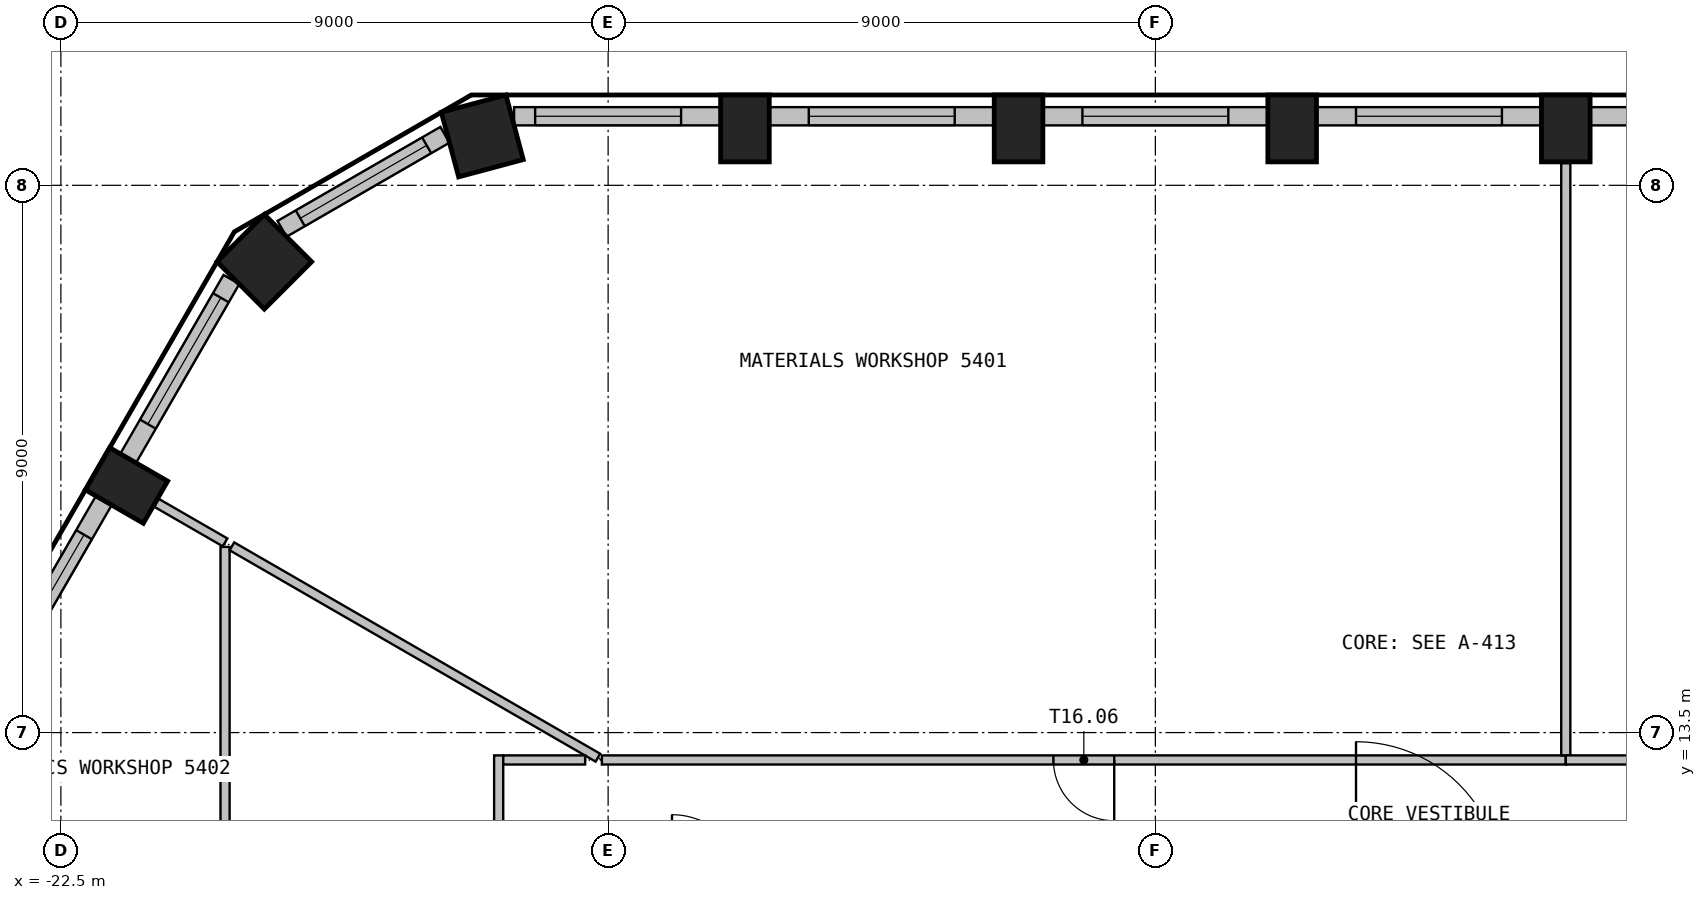
"""IFC4 building model, lengths in metres.
Left out: names, types, materials, properties, quantities, classifications, styles, units other than length and angle.
Written with IfcOpenShell. Run it as: python <this file> out.ifc"""

import sys

from ifc_helpers import new_model, si_unit, direction, frame, frame_2d, origin, origin_2d, place, context, subcontext, project, spatial, rectangle, extrude, element, fill, save


model = new_model("IFC4")
c1 = context("Model", 3, precision=1e-05, world=origin(), true_north=direction((0.0, 1.0)))
c2 = subcontext(c1, "Body", "Model", "MODEL_VIEW")
j1 = project(units=[si_unit("LENGTHUNIT", "METRE"), si_unit("PLANEANGLEUNIT", "RADIAN")], contexts=[c1])
p1 = place(None, origin())
s1 = spatial("IfcSite", under=j1, at=p1, CompositionType="ELEMENT")
p2 = place(p1, origin())
s2 = spatial("IfcBuilding", under=s1, at=p2, CompositionType="ELEMENT")
p3 = place(p2, frame((0.0, 0.0, 219.0)))
s3 = spatial("IfcBuildingStorey", under=s2, at=p3, CompositionType="ELEMENT", Elevation=219.0)
for number, where, z_axis, x_axis in (
    (1, (2.25, 23.436, 0.0), (0.0, 0.0, 1.0), (-1.0, 0.0, 0.0)),
    (2, (-2.25, 23.436, 0.0), (0.0, 0.0, 1.0), (-1.0, 0.0, 0.0)),
    (3, (-6.75, 23.436, 0.0), (0.0, 0.0, 1.0), (-1.0, 0.0, 0.0)),
    (4, (-11.25, 23.436, 0.0), (0.0, 0.0, 1.0), (-1.0, 0.0, 0.0)),
):
    element("IfcColumn", number, at=place(p3, frame(where, z_axis=z_axis, x_axis=x_axis)), inside=s3, PredefinedType="COLUMN", context=c2, shape_type="SweptSolid", body=[
        extrude(rectangle(XDim=0.8, YDim=1.1, at=origin_2d()), origin(), (0.0, 0.0, 1.0), 3.55),
    ])
for number, where, z_axis, x_axis in (
    (5, (-15.57, 23.312, 0.0), (0.0, 0.0, 1.0), (-0.966, -0.259, 0.0)),
    (6, (-19.154, 21.242, 0.0), (0.0, 0.0, 1.0), (-0.707, -0.707, 0.0)),
):
    element("IfcColumn", number, at=place(p3, frame(where, z_axis=z_axis, x_axis=x_axis)), inside=s3, PredefinedType="COLUMN", context=c2, shape_type="SweptSolid", body=[
        extrude(rectangle(XDim=1.1, YDim=1.1, at=origin_2d()), origin(), (0.0, 0.0, 1.0), 3.55),
    ])
p4 = place(p3, frame((-21.421, 17.563, 0.0), z_axis=(0.0, 0.0, 1.0), x_axis=(-0.5, -0.866025403784, 0.0)))
e7 = element("IfcColumn", 7, at=p4, inside=s3, PredefinedType="COLUMN", context=c2, shape_type="SweptSolid", body=[
    extrude(rectangle(XDim=0.8, YDim=1.1, at=origin_2d()), origin(), (0.0, 0.0, 1.0), 3.55),
])
p5 = place(p3, frame((6.35, 23.635, 0.0), z_axis=(0.0, 0.0, 1.0), x_axis=(-1.0, 0.0, 0.0)))
e8 = element("IfcWall", 8, at=p5, inside=s3, PredefinedType="SOLIDWALL", context=c2, shape_type="SweptSolid", body=[
    extrude(rectangle(XDim=3.699, YDim=0.3, at=frame_2d((1.85, 0.0))), origin(), (0.0, 0.0, 1.0), 3.55),
])
p6 = place(p5, frame((0.649, 0.0, 0.9)))
e9 = element("IfcOpeningElement", 9, at=p6, cuts=e8, PredefinedType="OPENING", context=c2, shape_type="SweptSolid", body=[
    extrude(rectangle(XDim=2.4, YDim=2.1, at=frame_2d((1.2, 1.05))), frame((0.0, 0.16, 0.0), z_axis=(0.0, -1.0, 0.0), x_axis=(1.0, 0.0, 0.0)), (0.0, 0.0, 1.0), 0.32),
])
p7 = place(p3, frame((1.85, 23.635, 0.0), z_axis=(0.0, 0.0, 1.0), x_axis=(-1.0, 0.0, 0.0)))
e10 = element("IfcWall", 10, at=p7, inside=s3, PredefinedType="SOLIDWALL", context=c2, shape_type="SweptSolid", body=[
    extrude(rectangle(XDim=3.699, YDim=0.3, at=frame_2d((1.85, 0.0))), origin(), (0.0, 0.0, 1.0), 3.55),
])
p8 = place(p7, frame((0.649, 0.0, 0.9)))
e11 = element("IfcOpeningElement", 11, at=p8, cuts=e10, PredefinedType="OPENING", context=c2, shape_type="SweptSolid", body=[
    extrude(rectangle(XDim=2.4, YDim=2.1, at=frame_2d((1.2, 1.05))), frame((0.0, 0.16, 0.0), z_axis=(0.0, -1.0, 0.0), x_axis=(1.0, 0.0, 0.0)), (0.0, 0.0, 1.0), 0.32),
])
p9 = place(p3, frame((-2.65, 23.635, 0.0), z_axis=(0.0, 0.0, 1.0), x_axis=(-1.0, 0.0, 0.0)))
e12 = element("IfcWall", 12, at=p9, inside=s3, PredefinedType="SOLIDWALL", context=c2, shape_type="SweptSolid", body=[
    extrude(rectangle(XDim=3.699, YDim=0.3, at=frame_2d((1.85, 0.0))), origin(), (0.0, 0.0, 1.0), 3.55),
])
p10 = place(p9, frame((0.649, 0.0, 0.9)))
e13 = element("IfcOpeningElement", 13, at=p10, cuts=e12, PredefinedType="OPENING", context=c2, shape_type="SweptSolid", body=[
    extrude(rectangle(XDim=2.4, YDim=2.1, at=frame_2d((1.2, 1.05))), frame((0.0, 0.16, 0.0), z_axis=(0.0, -1.0, 0.0), x_axis=(1.0, 0.0, 0.0)), (0.0, 0.0, 1.0), 0.32),
])
p11 = place(p3, frame((-7.15, 23.635, 0.0), z_axis=(0.0, 0.0, 1.0), x_axis=(-1.0, 0.0, 0.0)))
e14 = element("IfcWall", 14, at=p11, inside=s3, PredefinedType="SOLIDWALL", context=c2, shape_type="SweptSolid", body=[
    extrude(rectangle(XDim=3.699, YDim=0.3, at=frame_2d((1.85, 0.0))), origin(), (0.0, 0.0, 1.0), 3.55),
])
p12 = place(p11, frame((0.649, 0.0, 0.9)))
e15 = element("IfcOpeningElement", 15, at=p12, cuts=e14, PredefinedType="OPENING", context=c2, shape_type="SweptSolid", body=[
    extrude(rectangle(XDim=2.4, YDim=2.1, at=frame_2d((1.2, 1.05))), frame((0.0, 0.16, 0.0), z_axis=(0.0, -1.0, 0.0), x_axis=(1.0, 0.0, 0.0)), (0.0, 0.0, 1.0), 0.32),
])
p13 = place(p3, frame((-11.65, 23.635, 0.0), z_axis=(0.0, 0.0, 1.0), x_axis=(-1.0, 0.0, 0.0)))
e16 = element("IfcWall", 16, at=p13, inside=s3, PredefinedType="SOLIDWALL", context=c2, shape_type="SweptSolid", body=[
    extrude(rectangle(XDim=3.396, YDim=0.3, at=frame_2d((1.698, 0.0))), origin(), (0.0, 0.0, 1.0), 3.55),
])
p14 = place(p13, frame((0.649, 0.0, 0.9)))
e17 = element("IfcOpeningElement", 17, at=p14, cuts=e16, PredefinedType="OPENING", context=c2, shape_type="SweptSolid", body=[
    extrude(rectangle(XDim=2.4, YDim=2.1, at=frame_2d((1.2, 1.05))), frame((0.0, 0.16, 0.0), z_axis=(0.0, -1.0, 0.0), x_axis=(1.0, 0.0, 0.0)), (0.0, 0.0, 1.0), 0.32),
])
p15 = place(p3, frame((-16.184, 23.331, 0.0), z_axis=(0.0, 0.0, 1.0), x_axis=(-0.865994975416, -0.500052699777, 0.0)))
e18 = element("IfcWall", 18, at=p15, inside=s3, PredefinedType="SOLIDWALL", context=c2, shape_type="SweptSolid", body=[
    extrude(rectangle(XDim=3.093, YDim=0.3, at=frame_2d((1.546, 0.0))), origin(), (0.0, 0.0, 1.0), 3.55),
])
p16 = place(p15, frame((0.346, 0.0, 0.9)))
e19 = element("IfcOpeningElement", 19, at=p16, cuts=e18, PredefinedType="OPENING", context=c2, shape_type="SweptSolid", body=[
    extrude(rectangle(XDim=2.4, YDim=2.1, at=frame_2d((1.2, 1.05))), frame((0.0, 0.16, 0.0), z_axis=(0.0, -1.0, 0.0), x_axis=(1.0, 0.0, 0.0)), (0.0, 0.0, 1.0), 0.32),
])
p17 = place(p3, frame((-19.696, 20.951, 0.0), z_axis=(0.0, 0.0, 1.0), x_axis=(-0.500012868213, -0.866017974191, 0.0)))
e20 = element("IfcWall", 20, at=p17, inside=s3, PredefinedType="SOLIDWALL", context=c2, shape_type="SweptSolid", body=[
    extrude(rectangle(XDim=3.396, YDim=0.3, at=frame_2d((1.698, 0.0))), origin(), (0.0, 0.0, 1.0), 3.55),
])
p18 = place(p17, frame((0.346, 0.0, 0.9)))
e21 = element("IfcOpeningElement", 21, at=p18, cuts=e20, PredefinedType="OPENING", context=c2, shape_type="SweptSolid", body=[
    extrude(rectangle(XDim=2.4, YDim=2.1, at=frame_2d((1.2, 1.05))), frame((0.0, 0.16, 0.0), z_axis=(0.0, -1.0, 0.0), x_axis=(1.0, 0.0, 0.0)), (0.0, 0.0, 1.0), 0.32),
])
p19 = place(p3, frame((-21.794, 17.317, 0.0), z_axis=(0.0, 0.0, 1.0), x_axis=(-0.500029062817, -0.866008623709, 0.0)))
e22 = element("IfcWall", 22, at=p19, inside=s3, PredefinedType="SOLIDWALL", context=c2, shape_type="SweptSolid", body=[
    extrude(rectangle(XDim=3.699, YDim=0.3, at=frame_2d((1.85, 0.0))), origin(), (0.0, 0.0, 1.0), 3.55),
])
p20 = place(p19, frame((0.649, 0.0, 0.9)))
e23 = element("IfcOpeningElement", 23, at=p20, cuts=e22, PredefinedType="OPENING", context=c2, shape_type="SweptSolid", body=[
    extrude(rectangle(XDim=2.4, YDim=2.1, at=frame_2d((1.2, 1.05))), frame((0.0, 0.16, 0.0), z_axis=(0.0, -1.0, 0.0), x_axis=(1.0, 0.0, 0.0)), (0.0, 0.0, 1.0), 0.32),
])
p21 = place(p3, frame((-20.927, 17.278, 0.0), z_axis=(0.0, 0.0, 1.0), x_axis=(0.866157475642, -0.499771175029, 0.0)))
e24 = element("IfcWall", 24, at=p21, inside=s3, PredefinedType="PARTITIONING", context=c2, shape_type="SweptSolid", body=[
    extrude(rectangle(XDim=1.301, YDim=0.15, at=frame_2d((0.651, 0.0))), origin(), (0.0, 0.0, 1.0), 3.55),
])
p22 = place(p3, frame((-19.8, 16.553, 0.0), z_axis=(0.0, 0.0, 1.0), x_axis=(0.0, -1.0, 0.0)))
e25 = element("IfcWall", 25, at=p22, inside=s3, PredefinedType="PARTITIONING", context=c2, shape_type="SweptSolid", body=[
    extrude(rectangle(XDim=14.228, YDim=0.15, at=frame_2d((7.114, 0.0))), origin(), (0.0, 0.0, 1.0), 3.55),
])
p23 = place(p3, frame((-19.688, 16.563, 0.0), z_axis=(0.0, 0.0, 1.0), x_axis=(0.866012448988, -0.500022437694, 0.0)))
e26 = element("IfcWall", 26, at=p23, inside=s3, PredefinedType="PARTITIONING", context=c2, shape_type="SweptSolid", body=[
    extrude(rectangle(XDim=6.951, YDim=0.15, at=frame_2d((3.476, 0.0))), origin(), (0.0, 0.0, 1.0), 3.55),
])
p24 = place(p3, frame((-15.3, 13.125, 0.0), z_axis=(0.0, 0.0, 1.0), x_axis=(0.0, -1.0, 0.0)))
e27 = element("IfcWall", 27, at=p24, inside=s3, PredefinedType="PARTITIONING", context=c2, shape_type="SweptSolid", body=[
    extrude(rectangle(XDim=10.8, YDim=0.15, at=frame_2d((5.4, 0.0))), origin(), (0.0, 0.0, 1.0), 3.55),
])
p25 = place(p24, frame((4.9, 0.0, 0.0)))
e28 = element("IfcOpeningElement", 28, at=p25, cuts=e27, PredefinedType="OPENING", context=c2, shape_type="SweptSolid", body=[
    extrude(rectangle(XDim=1.0, YDim=2.1, at=frame_2d((0.5, 1.05))), frame((0.0, 0.085, 0.0), z_axis=(0.0, -1.0, 0.0), x_axis=(1.0, 0.0, 0.0)), (0.0, 0.0, 1.0), 0.17),
])
p26 = place(p3, frame((-13.878, 13.05, 0.0), z_axis=(0.0, 0.0, 1.0), x_axis=(-1.0, 0.0, 0.0)))
e29 = element("IfcWall", 29, at=p26, inside=s3, PredefinedType="PARTITIONING", context=c2, shape_type="SweptSolid", body=[
    extrude(rectangle(XDim=1.347, YDim=0.15, at=frame_2d((0.674, 0.0))), origin(), (0.0, 0.0, 1.0), 3.55),
])
p27 = place(p3, frame((2.25, 13.05, 0.0), z_axis=(0.0, 0.0, 1.0), x_axis=(-1.0, 0.0, 0.0)))
e30 = element("IfcWall", 30, at=p27, inside=s3, PredefinedType="PARTITIONING", context=c2, shape_type="SweptSolid", body=[
    extrude(rectangle(XDim=15.853, YDim=0.15, at=frame_2d((7.927, 0.0))), origin(), (0.0, 0.0, 1.0), 3.55),
])
p28 = place(p27, frame((7.427, 0.0, 0.0)))
e31 = element("IfcOpeningElement", 31, at=p28, cuts=e30, PredefinedType="OPENING", context=c2, shape_type="SweptSolid", body=[
    extrude(rectangle(XDim=1.0, YDim=2.1, at=frame_2d((0.5, 1.05))), frame((0.0, 0.085, 0.0), z_axis=(0.0, -1.0, 0.0), x_axis=(1.0, 0.0, 0.0)), (0.0, 0.0, 1.0), 0.17),
])
p29 = place(p3, frame((2.25, 22.865, 0.0), z_axis=(0.0, 0.0, 1.0), x_axis=(0.0, -1.0, 0.0)))
e32 = element("IfcWall", 32, at=p29, inside=s3, PredefinedType="PARTITIONING", context=c2, shape_type="SweptSolid", body=[
    extrude(rectangle(XDim=9.74, YDim=0.15, at=frame_2d((4.87, 0.0))), origin(), (0.0, 0.0, 1.0), 3.55),
])
p30 = place(p3, frame((11.25, 13.05, 0.0), z_axis=(0.0, 0.0, 1.0), x_axis=(-1.0, 0.0, 0.0)))
e33 = element("IfcWall", 33, at=p30, inside=s3, PredefinedType="PARTITIONING", context=c2, shape_type="SweptSolid", body=[
    extrude(rectangle(XDim=9.0, YDim=0.15, at=frame_2d((4.5, 0.0))), origin(), (0.0, 0.0, 1.0), 3.55),
])
p31 = place(p30, frame((4.0, 0.0, 0.0)))
e34 = element("IfcOpeningElement", 34, at=p31, cuts=e33, PredefinedType="OPENING", context=c2, shape_type="SweptSolid", body=[
    extrude(rectangle(XDim=1.0, YDim=2.1, at=frame_2d((0.5, 1.05))), frame((0.0, 0.085, 0.0), z_axis=(0.0, -1.0, 0.0), x_axis=(1.0, 0.0, 0.0)), (0.0, 0.0, 1.0), 0.17),
])
p32 = place(p8, origin())
e35 = element("IfcWindow", 35, at=p32, inside=s3, PartitioningType="SINGLE_PANEL", PredefinedType="WINDOW", context=c2, shape_type="SweptSolid", body=[
    extrude(rectangle(XDim=2.4, YDim=2.1, at=frame_2d((1.2, 1.05))), frame((0.0, 0.03, 0.0), z_axis=(0.0, -1.0, 0.0), x_axis=(1.0, 0.0, 0.0)), (0.0, 0.0, 1.0), 0.06),
])
fill(e11, e35)
p33 = place(p10, origin())
e36 = element("IfcWindow", 36, at=p33, inside=s3, PartitioningType="SINGLE_PANEL", PredefinedType="WINDOW", context=c2, shape_type="SweptSolid", body=[
    extrude(rectangle(XDim=2.4, YDim=2.1, at=frame_2d((1.2, 1.05))), frame((0.0, 0.03, 0.0), z_axis=(0.0, -1.0, 0.0), x_axis=(1.0, 0.0, 0.0)), (0.0, 0.0, 1.0), 0.06),
])
fill(e13, e36)
p34 = place(p12, origin())
e37 = element("IfcWindow", 37, at=p34, inside=s3, PartitioningType="SINGLE_PANEL", PredefinedType="WINDOW", context=c2, shape_type="SweptSolid", body=[
    extrude(rectangle(XDim=2.4, YDim=2.1, at=frame_2d((1.2, 1.05))), frame((0.0, 0.03, 0.0), z_axis=(0.0, -1.0, 0.0), x_axis=(1.0, 0.0, 0.0)), (0.0, 0.0, 1.0), 0.06),
])
fill(e15, e37)
p35 = place(p14, origin())
e38 = element("IfcWindow", 38, at=p35, inside=s3, PartitioningType="SINGLE_PANEL", PredefinedType="WINDOW", context=c2, shape_type="SweptSolid", body=[
    extrude(rectangle(XDim=2.4, YDim=2.1, at=frame_2d((1.2, 1.05))), frame((0.0, 0.03, 0.0), z_axis=(0.0, -1.0, 0.0), x_axis=(1.0, 0.0, 0.0)), (0.0, 0.0, 1.0), 0.06),
])
fill(e17, e38)
p36 = place(p16, origin())
e39 = element("IfcWindow", 39, at=p36, inside=s3, PartitioningType="SINGLE_PANEL", PredefinedType="WINDOW", context=c2, shape_type="SweptSolid", body=[
    extrude(rectangle(XDim=2.4, YDim=2.1, at=frame_2d((1.2, 1.05))), frame((0.0, 0.03, 0.0), z_axis=(0.0, -1.0, 0.0), x_axis=(1.0, 0.0, 0.0)), (0.0, 0.0, 1.0), 0.06),
])
fill(e19, e39)
p37 = place(p18, origin())
e40 = element("IfcWindow", 40, at=p37, inside=s3, PartitioningType="SINGLE_PANEL", PredefinedType="WINDOW", context=c2, shape_type="SweptSolid", body=[
    extrude(rectangle(XDim=2.4, YDim=2.1, at=frame_2d((1.2, 1.05))), frame((0.0, 0.03, 0.0), z_axis=(0.0, -1.0, 0.0), x_axis=(1.0, 0.0, 0.0)), (0.0, 0.0, 1.0), 0.06),
])
fill(e21, e40)
p38 = place(p20, origin())
e41 = element("IfcWindow", 41, at=p38, inside=s3, PartitioningType="SINGLE_PANEL", PredefinedType="WINDOW", context=c2, shape_type="SweptSolid", body=[
    extrude(rectangle(XDim=2.4, YDim=2.1, at=frame_2d((1.2, 1.05))), frame((0.0, 0.03, 0.0), z_axis=(0.0, -1.0, 0.0), x_axis=(1.0, 0.0, 0.0)), (0.0, 0.0, 1.0), 0.06),
])
fill(e23, e41)
p39 = place(p28, origin())
e42 = element("IfcDoor", 42, at=p39, inside=s3, OperationType="SINGLE_SWING_RIGHT", PredefinedType="DOOR", context=c2, shape_type="SweptSolid", body=[
    extrude(rectangle(XDim=1.0, YDim=2.1, at=frame_2d((0.5, 1.05))), frame((0.0, 0.025, 0.0), z_axis=(0.0, -1.0, 0.0), x_axis=(1.0, 0.0, 0.0)), (0.0, 0.0, 1.0), 0.05),
])
fill(e31, e42)
save(model, sys.argv[1])
